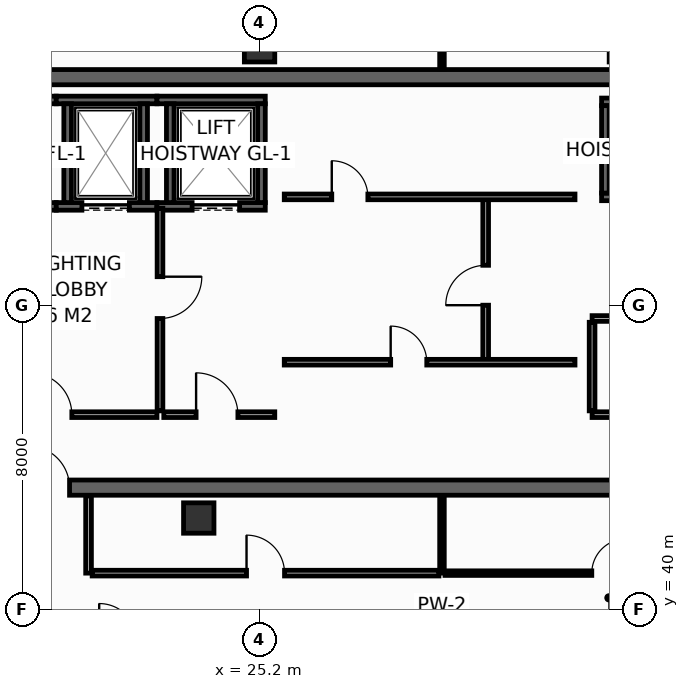
"""IFC4 building model, lengths in metres.
Left out: names, types, materials, properties, quantities, classifications, styles, units other than length and angle.
Written with IfcOpenShell. Run it as: python <this file> out.ifc"""

import sys

from ifc_helpers import new_model, si_unit, direction, frame, frame_2d, origin, origin_2d, place, context, subcontext, project, spatial, rectangle, hollow_rectangle, extrude, element, fill, save


model = new_model("IFC4")
c1 = context("Model", 3, precision=1e-05, world=origin(), true_north=direction((0.0, 1.0)))
c2 = subcontext(c1, "Body", "Model", "MODEL_VIEW")
j1 = project(units=[si_unit("LENGTHUNIT", "METRE"), si_unit("PLANEANGLEUNIT", "RADIAN")], contexts=[c1])
p1 = place(None, origin())
s1 = spatial("IfcSite", under=j1, at=p1, CompositionType="ELEMENT")
p2 = place(p1, origin())
s2 = spatial("IfcBuilding", under=s1, at=p2, CompositionType="ELEMENT")
p3 = place(p2, frame((0.0, 0.0, 238.2)))
s3 = spatial("IfcBuildingStorey", under=s2, at=p3, CompositionType="ELEMENT", Elevation=238.2)
p4 = place(p3, frame((13.7, 43.2, 0.0), z_axis=(0.0, 0.0, 1.0), x_axis=(1.0, 0.0, 0.0)))
e1 = element("IfcWall", 1, at=p4, inside=s3, PredefinedType="SHEAR", context=c2, shape_type="SweptSolid", body=[
    extrude(rectangle(XDim=32.5, YDim=0.4, at=frame_2d((16.25, 0.0))), origin(), (0.0, 0.0, 1.0), 3.55),
])
p5 = place(p4, frame((5.4, 0.0, 0.0)))
e2 = element("IfcOpeningElement", 2, at=p5, cuts=e1, PredefinedType="OPENING", context=c2, shape_type="SweptSolid", body=[
    extrude(rectangle(XDim=1.1, YDim=2.15, at=frame_2d((0.55, 1.075))), frame((0.0, 0.21, 0.0), z_axis=(0.0, -1.0, 0.0), x_axis=(1.0, 0.0, 0.0)), (0.0, 0.0, 1.0), 0.42),
])
p6 = place(p4, frame((25.6, 0.0, 0.0)))
e3 = element("IfcOpeningElement", 3, at=p6, cuts=e1, PredefinedType="OPENING", context=c2, shape_type="SweptSolid", body=[
    extrude(rectangle(XDim=1.1, YDim=2.15, at=frame_2d((0.55, 1.075))), frame((0.0, 0.21, 0.0), z_axis=(0.0, -1.0, 0.0), x_axis=(1.0, 0.0, 0.0)), (0.0, 0.0, 1.0), 0.42),
])
p7 = place(p3, frame((13.7, 54.0, 0.0), z_axis=(0.0, 0.0, 1.0), x_axis=(1.0, 0.0, 0.0)))
e4 = element("IfcWall", 4, at=p7, inside=s3, PredefinedType="SHEAR", context=c2, shape_type="SweptSolid", body=[
    extrude(rectangle(XDim=32.5, YDim=0.4, at=frame_2d((16.25, 0.0))), origin(), (0.0, 0.0, 1.0), 3.55),
])
for number, where, z_axis, x_axis in (
    (5, (25.2, 54.8, 0.0), (0.0, 0.0, 1.0), (1.0, 0.0, 0.0)),
    (6, (23.6, 42.4, 0.0), (0.0, 0.0, 1.0), (1.0, 0.0, 0.0)),
):
    element("IfcColumn", number, at=place(p3, frame(where, z_axis=z_axis, x_axis=x_axis)), inside=s3, PredefinedType="COLUMN", context=c2, shape_type="SweptSolid", body=[
        extrude(hollow_rectangle(XDim=0.8, YDim=0.8, WallThickness=0.036, at=origin_2d()), origin(), (0.0, 0.0, 1.0), 3.8),
    ])
p8 = place(p3, frame((17.33, 50.6, 0.0), z_axis=(0.0, 0.0, 1.0), x_axis=(1.0, 0.0, 0.0)))
e7 = element("IfcWall", 7, at=p8, inside=s3, PredefinedType="SHEAR", context=c2, shape_type="SweptSolid", body=[
    extrude(rectangle(XDim=2.52, YDim=0.2, at=frame_2d((1.26, 0.0))), origin(), (0.0, 0.0, 1.0), 3.55),
])
p9 = place(p8, frame((0.595, 0.0, 0.0)))
e8 = element("IfcOpeningElement", 8, at=p9, cuts=e7, PredefinedType="OPENING", context=c2, shape_type="SweptSolid", body=[
    extrude(rectangle(XDim=1.25, YDim=2.3, at=frame_2d((0.625, 1.15))), frame((0.0, 0.11, 0.0), z_axis=(0.0, -1.0, 0.0), x_axis=(1.0, 0.0, 0.0)), (0.0, 0.0, 1.0), 0.22),
])
p10 = place(p3, frame((17.33, 53.4, 0.0), z_axis=(0.0, 0.0, 1.0), x_axis=(1.0, 0.0, 0.0)))
e9 = element("IfcWall", 9, at=p10, inside=s3, PredefinedType="SHEAR", context=c2, shape_type="SweptSolid", body=[
    extrude(rectangle(XDim=2.52, YDim=0.2, at=frame_2d((1.26, 0.0))), origin(), (0.0, 0.0, 1.0), 3.55),
])
p11 = place(p3, frame((19.85, 50.6, 0.0), z_axis=(0.0, 0.0, 1.0), x_axis=(1.0, 0.0, 0.0)))
e10 = element("IfcWall", 10, at=p11, inside=s3, PredefinedType="SHEAR", context=c2, shape_type="SweptSolid", body=[
    extrude(rectangle(XDim=2.65, YDim=0.2, at=frame_2d((1.325, 0.0))), origin(), (0.0, 0.0, 1.0), 3.55),
])
p12 = place(p11, frame((0.675, 0.0, 0.0)))
e11 = element("IfcOpeningElement", 11, at=p12, cuts=e10, PredefinedType="OPENING", context=c2, shape_type="SweptSolid", body=[
    extrude(rectangle(XDim=1.25, YDim=2.3, at=frame_2d((0.625, 1.15))), frame((0.0, 0.11, 0.0), z_axis=(0.0, -1.0, 0.0), x_axis=(1.0, 0.0, 0.0)), (0.0, 0.0, 1.0), 0.22),
])
p13 = place(p3, frame((19.85, 53.4, 0.0), z_axis=(0.0, 0.0, 1.0), x_axis=(1.0, 0.0, 0.0)))
e12 = element("IfcWall", 12, at=p13, inside=s3, PredefinedType="SHEAR", context=c2, shape_type="SweptSolid", body=[
    extrude(rectangle(XDim=2.65, YDim=0.2, at=frame_2d((1.325, 0.0))), origin(), (0.0, 0.0, 1.0), 3.55),
])
for number, where, z_axis, x_axis in (
    (13, (20.15, 50.7, 0.0), (0.0, 0.0, 1.0), (0.0, 1.0, 0.0)),
    (14, (22.15, 50.7, 0.0), (0.0, 0.0, 1.0), (0.0, 1.0, 0.0)),
):
    element("IfcWall", number, at=place(p3, frame(where, z_axis=z_axis, x_axis=x_axis)), inside=s3, PredefinedType="SHEAR", context=c2, shape_type="SweptSolid", body=[
        extrude(rectangle(XDim=2.6, YDim=0.2, at=frame_2d((1.3, 0.0))), origin(), (0.0, 0.0, 1.0), 3.55),
    ])
p14 = place(p3, frame((22.5, 50.6, 0.0), z_axis=(0.0, 0.0, 1.0), x_axis=(1.0, 0.0, 0.0)))
e15 = element("IfcWall", 15, at=p14, inside=s3, PredefinedType="SHEAR", context=c2, shape_type="SweptSolid", body=[
    extrude(rectangle(XDim=2.85, YDim=0.2, at=frame_2d((1.425, 0.0))), origin(), (0.0, 0.0, 1.0), 3.55),
])
p15 = place(p14, frame((0.925, 0.0, 0.0)))
e16 = element("IfcOpeningElement", 16, at=p15, cuts=e15, PredefinedType="OPENING", context=c2, shape_type="SweptSolid", body=[
    extrude(rectangle(XDim=1.25, YDim=2.3, at=frame_2d((0.625, 1.15))), frame((0.0, 0.11, 0.0), z_axis=(0.0, -1.0, 0.0), x_axis=(1.0, 0.0, 0.0)), (0.0, 0.0, 1.0), 0.22),
])
p16 = place(p3, frame((22.5, 53.4, 0.0), z_axis=(0.0, 0.0, 1.0), x_axis=(1.0, 0.0, 0.0)))
e17 = element("IfcWall", 17, at=p16, inside=s3, PredefinedType="SHEAR", context=c2, shape_type="SweptSolid", body=[
    extrude(rectangle(XDim=2.85, YDim=0.2, at=frame_2d((1.425, 0.0))), origin(), (0.0, 0.0, 1.0), 3.55),
])
for number, where, z_axis, x_axis in (
    (18, (22.85, 50.7, 0.0), (0.0, 0.0, 1.0), (0.0, 1.0, 0.0)),
    (19, (25.25, 50.7, 0.0), (0.0, 0.0, 1.0), (0.0, 1.0, 0.0)),
):
    element("IfcWall", number, at=place(p3, frame(where, z_axis=z_axis, x_axis=x_axis)), inside=s3, PredefinedType="SHEAR", context=c2, shape_type="SweptSolid", body=[
        extrude(rectangle(XDim=2.6, YDim=0.2, at=frame_2d((1.3, 0.0))), origin(), (0.0, 0.0, 1.0), 3.55),
    ])
p17 = place(p3, frame((34.2, 50.85, 0.0), z_axis=(0.0, 0.0, 1.0), x_axis=(1.0, 0.0, 0.0)))
e20 = element("IfcWall", 20, at=p17, inside=s3, PredefinedType="SHEAR", context=c2, shape_type="SweptSolid", body=[
    extrude(rectangle(XDim=2.575, YDim=0.2, at=frame_2d((1.288, 0.0))), origin(), (0.0, 0.0, 1.0), 3.55),
])
p18 = place(p17, frame((0.65, 0.0, 0.0)))
e21 = element("IfcOpeningElement", 21, at=p18, cuts=e20, PredefinedType="OPENING", context=c2, shape_type="SweptSolid", body=[
    extrude(rectangle(XDim=1.1, YDim=2.2, at=frame_2d((0.55, 1.1))), frame((0.0, 0.11, 0.0), z_axis=(0.0, -1.0, 0.0), x_axis=(1.0, 0.0, 0.0)), (0.0, 0.0, 1.0), 0.22),
])
p19 = place(p3, frame((34.2, 53.35, 0.0), z_axis=(0.0, 0.0, 1.0), x_axis=(1.0, 0.0, 0.0)))
e22 = element("IfcWall", 22, at=p19, inside=s3, PredefinedType="SHEAR", context=c2, shape_type="SweptSolid", body=[
    extrude(rectangle(XDim=2.575, YDim=0.2, at=frame_2d((1.288, 0.0))), origin(), (0.0, 0.0, 1.0), 3.55),
])
p20 = place(p3, frame((34.3, 50.95, 0.0), z_axis=(0.0, 0.0, 1.0), x_axis=(0.0, 1.0, 0.0)))
e23 = element("IfcWall", 23, at=p20, inside=s3, PredefinedType="SHEAR", context=c2, shape_type="SweptSolid", body=[
    extrude(rectangle(XDim=2.3, YDim=0.2, at=frame_2d((1.15, 0.0))), origin(), (0.0, 0.0, 1.0), 3.55),
])
p21 = place(p3, frame((17.36, 45.12, 0.0), z_axis=(0.0, 0.0, 1.0), x_axis=(1.0, 0.0, 0.0)))
e24 = element("IfcWall", 24, at=p21, inside=s3, PredefinedType="PARTITIONING", context=c2, shape_type="SweptSolid", body=[
    extrude(rectangle(XDim=5.14, YDim=0.15, at=frame_2d((2.57, 0.0))), origin(), (0.0, 0.0, 1.0), 3.55),
])
p22 = place(p21, frame((1.8, 0.0, 0.0)))
e25 = element("IfcOpeningElement", 25, at=p22, cuts=e24, PredefinedType="OPENING", context=c2, shape_type="SweptSolid", body=[
    extrude(rectangle(XDim=1.1, YDim=2.15, at=frame_2d((0.55, 1.075))), frame((0.0, 0.085, 0.0), z_axis=(0.0, -1.0, 0.0), x_axis=(1.0, 0.0, 0.0)), (0.0, 0.0, 1.0), 0.17),
])
p23 = place(p3, frame((22.58, 50.55, 0.0), z_axis=(0.0, 0.0, 1.0), x_axis=(0.0, -1.0, 0.0)))
e26 = element("IfcWall", 26, at=p23, inside=s3, PredefinedType="PARTITIONING", context=c2, shape_type="SweptSolid", body=[
    extrude(rectangle(XDim=5.33, YDim=0.15, at=frame_2d((2.665, 0.0))), origin(), (0.0, 0.0, 1.0), 3.55),
])
p24 = place(p23, frame((1.8, 0.0, 0.0)))
e27 = element("IfcOpeningElement", 27, at=p24, cuts=e26, PredefinedType="OPENING", context=c2, shape_type="SweptSolid", body=[
    extrude(rectangle(XDim=1.1, YDim=2.15, at=frame_2d((0.55, 1.075))), frame((0.0, 0.085, 0.0), z_axis=(0.0, -1.0, 0.0), x_axis=(1.0, 0.0, 0.0)), (0.0, 0.0, 1.0), 0.17),
])
p25 = place(p3, frame((22.68, 45.12, 0.0), z_axis=(0.0, 0.0, 1.0), x_axis=(1.0, 0.0, 0.0)))
e28 = element("IfcWall", 28, at=p25, inside=s3, PredefinedType="PARTITIONING", context=c2, shape_type="SweptSolid", body=[
    extrude(rectangle(XDim=2.92, YDim=0.15, at=frame_2d((1.46, 0.0))), origin(), (0.0, 0.0, 1.0), 3.55),
])
p26 = place(p25, frame((0.85, 0.0, 0.0)))
e29 = element("IfcOpeningElement", 29, at=p26, cuts=e28, PredefinedType="OPENING", context=c2, shape_type="SweptSolid", body=[
    extrude(rectangle(XDim=1.1, YDim=2.15, at=frame_2d((0.55, 1.075))), frame((0.0, 0.085, 0.0), z_axis=(0.0, -1.0, 0.0), x_axis=(1.0, 0.0, 0.0)), (0.0, 0.0, 1.0), 0.17),
])
p27 = place(p3, frame((31.15, 46.5, 0.0), z_axis=(0.0, 0.0, 1.0), x_axis=(0.0, 1.0, 0.0)))
e30 = element("IfcWall", 30, at=p27, inside=s3, PredefinedType="PARTITIONING", context=c2, shape_type="SweptSolid", body=[
    extrude(rectangle(XDim=4.35, YDim=0.15, at=frame_2d((2.175, 0.0))), origin(), (0.0, 0.0, 1.0), 3.55),
])
p28 = place(p27, frame((1.5, 0.0, 0.0)))
e31 = element("IfcOpeningElement", 31, at=p28, cuts=e30, PredefinedType="OPENING", context=c2, shape_type="SweptSolid", body=[
    extrude(rectangle(XDim=1.05, YDim=2.15, at=frame_2d((0.525, 1.075))), frame((0.0, 0.085, 0.0), z_axis=(0.0, -1.0, 0.0), x_axis=(1.0, 0.0, 0.0)), (0.0, 0.0, 1.0), 0.17),
])
p29 = place(p3, frame((33.95, 45.12, 0.0), z_axis=(0.0, 0.0, 1.0), x_axis=(1.0, 0.0, 0.0)))
e32 = element("IfcWall", 32, at=p29, inside=s3, PredefinedType="PARTITIONING", context=c2, shape_type="SweptSolid", body=[
    extrude(rectangle(XDim=8.55, YDim=0.15, at=frame_2d((4.275, 0.0))), origin(), (0.0, 0.0, 1.0), 3.55),
])
p30 = place(p29, frame((0.95, 0.0, 0.0)))
e33 = element("IfcOpeningElement", 33, at=p30, cuts=e32, PredefinedType="OPENING", context=c2, shape_type="SweptSolid", body=[
    extrude(rectangle(XDim=0.95, YDim=2.15, at=frame_2d((0.475, 1.075))), frame((0.0, 0.085, 0.0), z_axis=(0.0, -1.0, 0.0), x_axis=(1.0, 0.0, 0.0)), (0.0, 0.0, 1.0), 0.17),
])
p31 = place(p29, frame((3.8, 0.0, 0.0)))
e34 = element("IfcOpeningElement", 34, at=p31, cuts=e32, PredefinedType="OPENING", context=c2, shape_type="SweptSolid", body=[
    extrude(rectangle(XDim=0.95, YDim=2.15, at=frame_2d((0.475, 1.075))), frame((0.0, 0.085, 0.0), z_axis=(0.0, -1.0, 0.0), x_axis=(1.0, 0.0, 0.0)), (0.0, 0.0, 1.0), 0.17),
])
p32 = place(p29, frame((6.65, 0.0, 0.0)))
e35 = element("IfcOpeningElement", 35, at=p32, cuts=e32, PredefinedType="OPENING", context=c2, shape_type="SweptSolid", body=[
    extrude(rectangle(XDim=0.95, YDim=2.15, at=frame_2d((0.475, 1.075))), frame((0.0, 0.085, 0.0), z_axis=(0.0, -1.0, 0.0), x_axis=(1.0, 0.0, 0.0)), (0.0, 0.0, 1.0), 0.17),
])
p33 = place(p3, frame((33.95, 47.65, 0.0), z_axis=(0.0, 0.0, 1.0), x_axis=(1.0, 0.0, 0.0)))
e36 = element("IfcWall", 36, at=p33, inside=s3, PredefinedType="PARTITIONING", context=c2, shape_type="SweptSolid", body=[
    extrude(rectangle(XDim=8.55, YDim=0.15, at=frame_2d((4.275, 0.0))), origin(), (0.0, 0.0, 1.0), 3.55),
])
p34 = place(p3, frame((33.95, 45.22, 0.0), z_axis=(0.0, 0.0, 1.0), x_axis=(0.0, 1.0, 0.0)))
e37 = element("IfcWall", 37, at=p34, inside=s3, PredefinedType="PARTITIONING", context=c2, shape_type="SweptSolid", body=[
    extrude(rectangle(XDim=2.33, YDim=0.15, at=frame_2d((1.165, 0.0))), origin(), (0.0, 0.0, 1.0), 3.55),
])
p35 = place(p3, frame((25.85, 50.85, 0.0), z_axis=(0.0, 0.0, 1.0), x_axis=(1.0, 0.0, 0.0)))
e38 = element("IfcWall", 38, at=p35, inside=s3, PredefinedType="PARTITIONING", context=c2, shape_type="SweptSolid", body=[
    extrude(rectangle(XDim=7.65, YDim=0.15, at=frame_2d((3.825, 0.0))), origin(), (0.0, 0.0, 1.0), 3.55),
])
p36 = place(p35, frame((1.25, 0.0, 0.0)))
e39 = element("IfcOpeningElement", 39, at=p36, cuts=e38, PredefinedType="OPENING", context=c2, shape_type="SweptSolid", body=[
    extrude(rectangle(XDim=0.95, YDim=2.15, at=frame_2d((0.475, 1.075))), frame((0.0, 0.085, 0.0), z_axis=(0.0, -1.0, 0.0), x_axis=(1.0, 0.0, 0.0)), (0.0, 0.0, 1.0), 0.17),
])
p37 = place(p3, frame((25.85, 46.5, 0.0), z_axis=(0.0, 0.0, 1.0), x_axis=(1.0, 0.0, 0.0)))
e40 = element("IfcWall", 40, at=p37, inside=s3, PredefinedType="PARTITIONING", context=c2, shape_type="SweptSolid", body=[
    extrude(rectangle(XDim=7.65, YDim=0.15, at=frame_2d((3.825, 0.0))), origin(), (0.0, 0.0, 1.0), 3.55),
])
p38 = place(p37, frame((2.8, 0.0, 0.0)))
e41 = element("IfcOpeningElement", 41, at=p38, cuts=e40, PredefinedType="OPENING", context=c2, shape_type="SweptSolid", body=[
    extrude(rectangle(XDim=0.95, YDim=2.15, at=frame_2d((0.475, 1.075))), frame((0.0, 0.085, 0.0), z_axis=(0.0, -1.0, 0.0), x_axis=(1.0, 0.0, 0.0)), (0.0, 0.0, 1.0), 0.17),
])
p39 = place(p3, frame((30.0, 54.22, 0.0), z_axis=(0.0, 0.0, 1.0), x_axis=(0.0, 1.0, 0.0)))
e42 = element("IfcWall", 42, at=p39, inside=s3, PredefinedType="PARTITIONING", context=c2, shape_type="SweptSolid", body=[
    extrude(rectangle(XDim=1.775, YDim=0.12, at=frame_2d((0.888, 0.0))), origin(), (0.0, 0.0, 1.0), 2.935),
])
p40 = place(p3, frame((20.7, 40.95, 0.0), z_axis=(0.0, 0.0, 1.0), x_axis=(0.0, 1.0, 0.0)))
e43 = element("IfcWall", 43, at=p40, inside=s3, PredefinedType="PARTITIONING", context=c2, shape_type="SweptSolid", body=[
    extrude(rectangle(XDim=2.03, YDim=0.15, at=frame_2d((1.015, 0.0))), origin(), (0.0, 0.0, 1.0), 3.55),
])
p41 = place(p3, frame((30.0, 40.95, 0.0), z_axis=(0.0, 0.0, 1.0), x_axis=(0.0, 1.0, 0.0)))
e44 = element("IfcWall", 44, at=p41, inside=s3, PredefinedType="PARTITIONING", context=c2, shape_type="SweptSolid", body=[
    extrude(rectangle(XDim=2.03, YDim=0.12, at=frame_2d((1.015, 0.0))), origin(), (0.0, 0.0, 1.0), 2.947),
])
p42 = place(p3, frame((20.795, 40.95, 0.0), z_axis=(0.0, 0.0, 1.0), x_axis=(1.0, 0.0, 0.0)))
e45 = element("IfcWall", 45, at=p42, inside=s3, PredefinedType="PARTITIONING", context=c2, shape_type="SweptSolid", body=[
    extrude(rectangle(XDim=9.125, YDim=0.15, at=frame_2d((4.562, 0.0))), origin(), (0.0, 0.0, 1.0), 2.947),
])
p43 = place(p42, frame((4.062, 0.0, 0.0)))
e46 = element("IfcOpeningElement", 46, at=p43, cuts=e45, PredefinedType="OPENING", context=c2, shape_type="SweptSolid", body=[
    extrude(rectangle(XDim=1.0, YDim=2.15, at=frame_2d((0.5, 1.075))), frame((0.0, 0.085, 0.0), z_axis=(0.0, -1.0, 0.0), x_axis=(1.0, 0.0, 0.0)), (0.0, 0.0, 1.0), 0.17),
])
p44 = place(p3, frame((30.08, 40.95, 0.0), z_axis=(0.0, 0.0, 1.0), x_axis=(1.0, 0.0, 0.0)))
e47 = element("IfcWall", 47, at=p44, inside=s3, PredefinedType="PARTITIONING", context=c2, shape_type="SweptSolid", body=[
    extrude(rectangle(XDim=8.625, YDim=0.12, at=frame_2d((4.312, 0.0))), origin(), (0.0, 0.0, 1.0), 2.947),
])
p45 = place(p44, frame((3.862, 0.0, 0.0)))
e48 = element("IfcOpeningElement", 48, at=p45, cuts=e47, PredefinedType="OPENING", context=c2, shape_type="SweptSolid", body=[
    extrude(rectangle(XDim=0.9, YDim=2.1, at=frame_2d((0.45, 1.05))), frame((0.0, 0.07, 0.0), z_axis=(0.0, -1.0, 0.0), x_axis=(1.0, 0.0, 0.0)), (0.0, 0.0, 1.0), 0.14),
])
p46 = place(p12, origin())
e49 = element("IfcDoor", 49, at=p46, inside=s3, OperationType="SLIDING_TO_LEFT", PredefinedType="DOOR", context=c2, shape_type="SweptSolid", body=[
    extrude(rectangle(XDim=1.25, YDim=2.3, at=frame_2d((0.625, 1.15))), frame((0.0, 0.025, 0.0), z_axis=(0.0, -1.0, 0.0), x_axis=(1.0, 0.0, 0.0)), (0.0, 0.0, 1.0), 0.05),
])
fill(e11, e49)
p47 = place(p15, origin())
e50 = element("IfcDoor", 50, at=p47, inside=s3, OperationType="SLIDING_TO_LEFT", PredefinedType="DOOR", context=c2, shape_type="SweptSolid", body=[
    extrude(rectangle(XDim=1.25, YDim=2.3, at=frame_2d((0.625, 1.15))), frame((0.0, 0.025, 0.0), z_axis=(0.0, -1.0, 0.0), x_axis=(1.0, 0.0, 0.0)), (0.0, 0.0, 1.0), 0.05),
])
fill(e16, e50)
p48 = place(p22, origin())
e51 = element("IfcDoor", 51, at=p48, inside=s3, OperationType="SINGLE_SWING_LEFT", PredefinedType="DOOR", context=c2, shape_type="SweptSolid", body=[
    extrude(rectangle(XDim=1.1, YDim=2.15, at=frame_2d((0.55, 1.075))), frame((0.0, 0.025, 0.0), z_axis=(0.0, -1.0, 0.0), x_axis=(1.0, 0.0, 0.0)), (0.0, 0.0, 1.0), 0.05),
])
fill(e25, e51)
p49 = place(p24, origin())
e52 = element("IfcDoor", 52, at=p49, inside=s3, OperationType="SINGLE_SWING_LEFT", PredefinedType="DOOR", context=c2, shape_type="SweptSolid", body=[
    extrude(rectangle(XDim=1.1, YDim=2.15, at=frame_2d((0.55, 1.075))), frame((0.0, 0.025, 0.0), z_axis=(0.0, -1.0, 0.0), x_axis=(1.0, 0.0, 0.0)), (0.0, 0.0, 1.0), 0.05),
])
fill(e27, e52)
p50 = place(p26, origin())
e53 = element("IfcDoor", 53, at=p50, inside=s3, OperationType="SINGLE_SWING_LEFT", PredefinedType="DOOR", context=c2, shape_type="SweptSolid", body=[
    extrude(rectangle(XDim=1.1, YDim=2.15, at=frame_2d((0.55, 1.075))), frame((0.0, 0.025, 0.0), z_axis=(0.0, -1.0, 0.0), x_axis=(1.0, 0.0, 0.0)), (0.0, 0.0, 1.0), 0.05),
])
fill(e29, e53)
p51 = place(p5, origin())
e54 = element("IfcDoor", 54, at=p51, inside=s3, OperationType="SINGLE_SWING_LEFT", PredefinedType="DOOR", context=c2, shape_type="SweptSolid", body=[
    extrude(rectangle(XDim=1.1, YDim=2.15, at=frame_2d((0.55, 1.075))), frame((0.0, 0.025, 0.0), z_axis=(0.0, -1.0, 0.0), x_axis=(1.0, 0.0, 0.0)), (0.0, 0.0, 1.0), 0.05),
])
fill(e2, e54)
p52 = place(p28, origin())
e55 = element("IfcDoor", 55, at=p52, inside=s3, OperationType="SINGLE_SWING_LEFT", PredefinedType="DOOR", context=c2, shape_type="SweptSolid", body=[
    extrude(rectangle(XDim=1.05, YDim=2.15, at=frame_2d((0.525, 1.075))), frame((0.0, 0.025, 0.0), z_axis=(0.0, -1.0, 0.0), x_axis=(1.0, 0.0, 0.0)), (0.0, 0.0, 1.0), 0.05),
])
fill(e31, e55)
p53 = place(p36, origin())
e56 = element("IfcDoor", 56, at=p53, inside=s3, OperationType="SINGLE_SWING_LEFT", PredefinedType="DOOR", context=c2, shape_type="SweptSolid", body=[
    extrude(rectangle(XDim=0.95, YDim=2.15, at=frame_2d((0.475, 1.075))), frame((0.0, 0.025, 0.0), z_axis=(0.0, -1.0, 0.0), x_axis=(1.0, 0.0, 0.0)), (0.0, 0.0, 1.0), 0.05),
])
fill(e39, e56)
p54 = place(p38, origin())
e57 = element("IfcDoor", 57, at=p54, inside=s3, OperationType="SINGLE_SWING_LEFT", PredefinedType="DOOR", context=c2, shape_type="SweptSolid", body=[
    extrude(rectangle(XDim=0.95, YDim=2.15, at=frame_2d((0.475, 1.075))), frame((0.0, 0.025, 0.0), z_axis=(0.0, -1.0, 0.0), x_axis=(1.0, 0.0, 0.0)), (0.0, 0.0, 1.0), 0.05),
])
fill(e41, e57)
p55 = place(p43, origin())
e58 = element("IfcDoor", 58, at=p55, inside=s3, OperationType="SINGLE_SWING_LEFT", PredefinedType="DOOR", context=c2, shape_type="SweptSolid", body=[
    extrude(rectangle(XDim=1.0, YDim=2.15, at=frame_2d((0.5, 1.075))), frame((0.0, 0.025, 0.0), z_axis=(0.0, -1.0, 0.0), x_axis=(1.0, 0.0, 0.0)), (0.0, 0.0, 1.0), 0.05),
])
fill(e46, e58)
p56 = place(p45, origin())
e59 = element("IfcDoor", 59, at=p56, inside=s3, OperationType="SINGLE_SWING_RIGHT", PredefinedType="DOOR", context=c2, shape_type="SweptSolid", body=[
    extrude(rectangle(XDim=0.9, YDim=2.1, at=frame_2d((0.45, 1.05))), frame((0.0, 0.025, 0.0), z_axis=(0.0, -1.0, 0.0), x_axis=(1.0, 0.0, 0.0)), (0.0, 0.0, 1.0), 0.05),
])
fill(e48, e59)
save(model, sys.argv[1])
